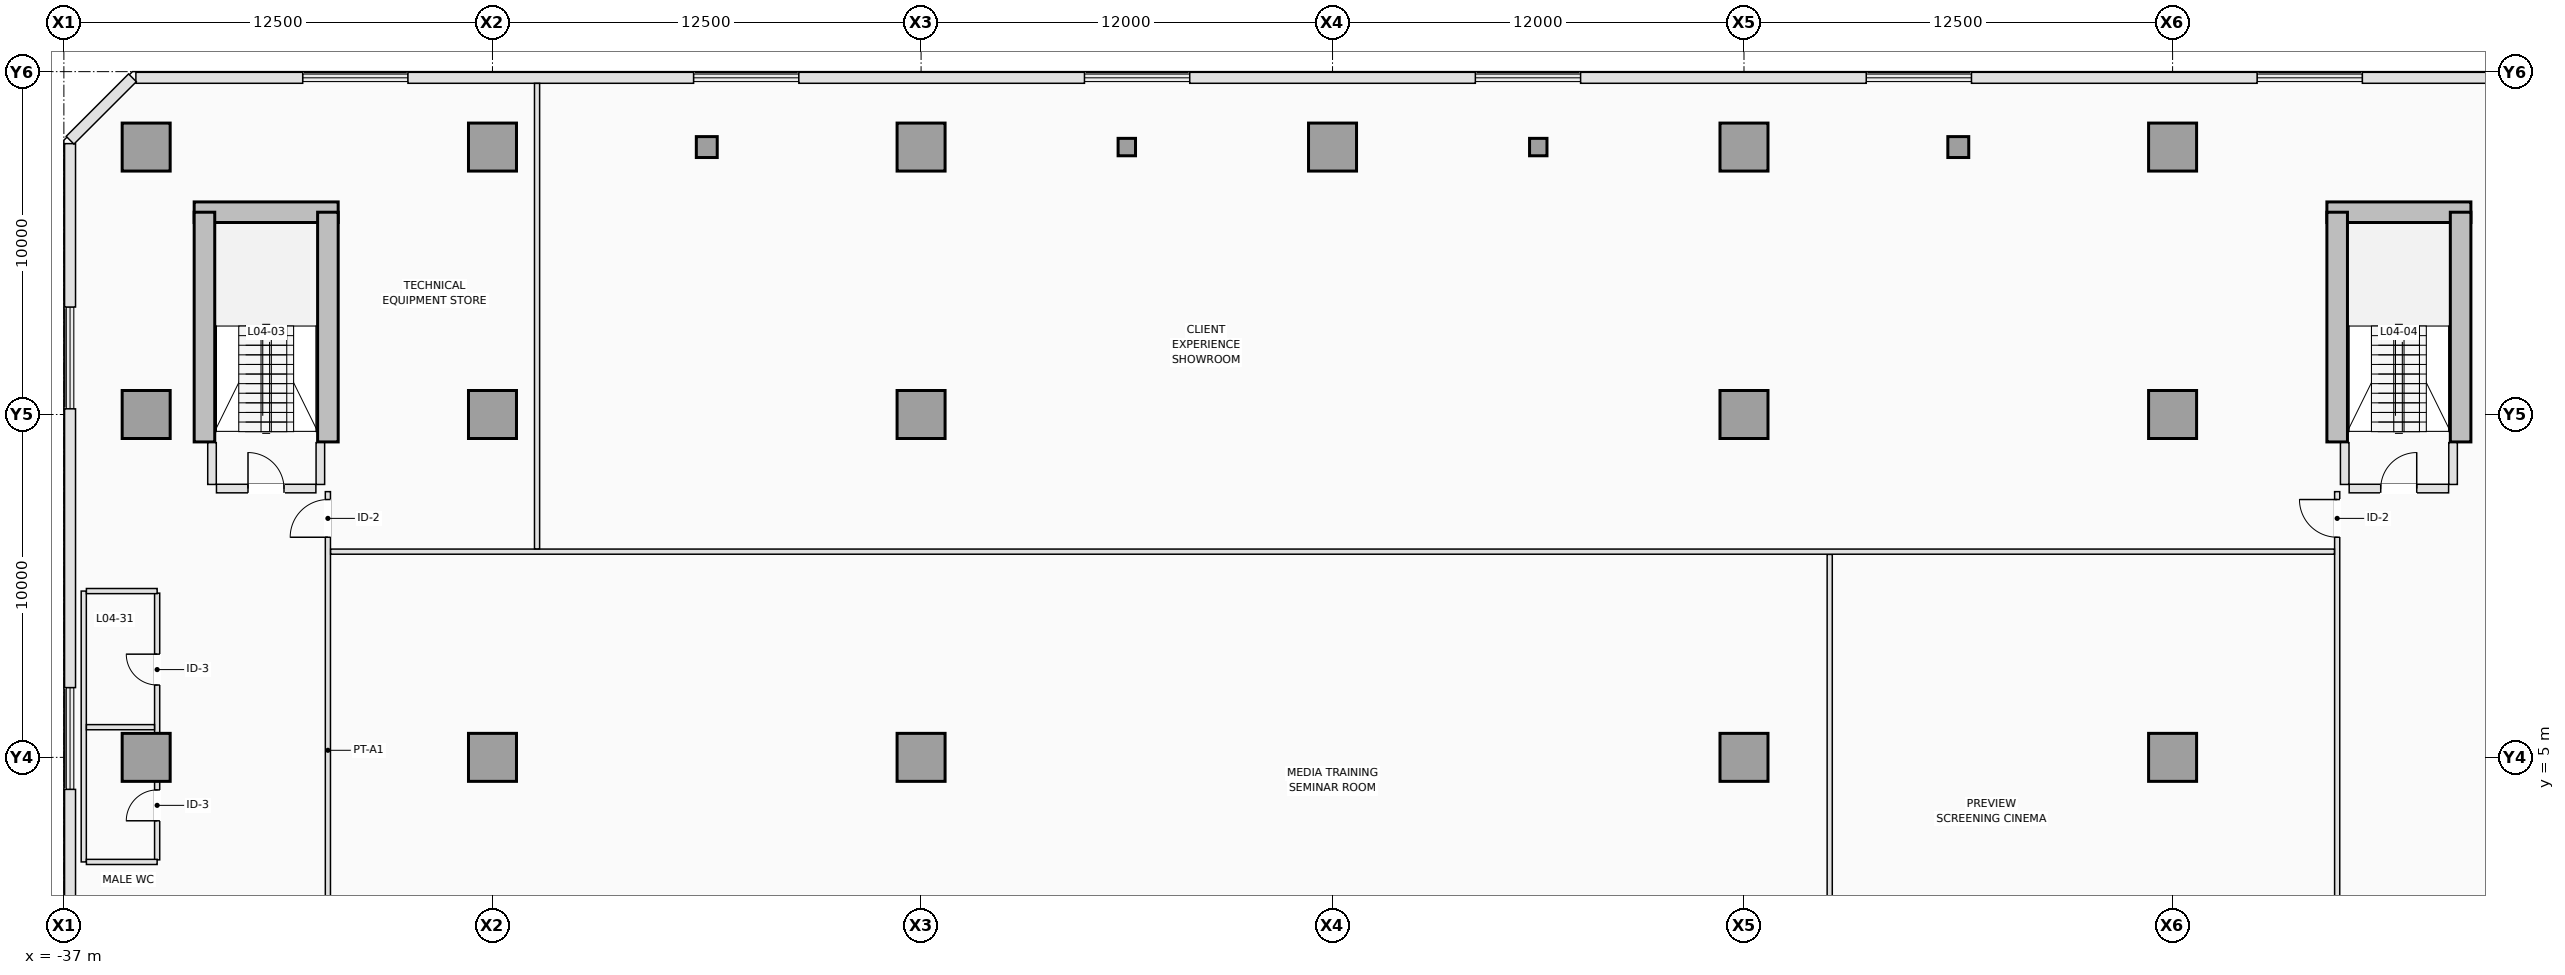
"""IFC4 building model, lengths in metres.
Left out: names, types, materials, properties, quantities, classifications, styles, units other than length and angle.
Written with IfcOpenShell. Run it as: python <this file> out.ifc"""

import sys

from ifc_helpers import new_model, si_unit, direction, frame, frame_2d, origin, origin_2d, place, context, subcontext, project, spatial, rectangle, hollow_circle, extrude, element, fill, save


model = new_model("IFC4")
c1 = context("Model", 3, precision=1e-05, world=origin(), true_north=direction((0.0, 1.0)))
c2 = subcontext(c1, "Body", "Model", "MODEL_VIEW")
j1 = project(units=[si_unit("LENGTHUNIT", "METRE"), si_unit("PLANEANGLEUNIT", "RADIAN")], contexts=[c1])
p1 = place(None, origin())
s1 = spatial("IfcSite", under=j1, at=p1, CompositionType="ELEMENT")
p2 = place(p1, origin())
s2 = spatial("IfcBuilding", under=s1, at=p2, CompositionType="ELEMENT")
p3 = place(p2, frame((0.0, 0.0, 18.5)))
s3 = spatial("IfcBuildingStorey", under=s2, at=p3, CompositionType="ELEMENT", Elevation=18.5)
p4 = place(p3, frame((-33.2, 20.9, 0.0), z_axis=(0.0, 0.0, 1.0), x_axis=(1.0, 0.0, 0.0)))
e1 = element("IfcWall", 1, at=p4, inside=s3, PredefinedType="SHEAR", context=c2, shape_type="SweptSolid", body=[
    extrude(rectangle(XDim=4.2, YDim=0.6, at=frame_2d((2.1, 0.0))), origin(), (0.0, 0.0, 1.0), 4.5),
])
for number, where, z_axis, x_axis in (
    (2, (-32.9, 14.2, 0.0), (0.0, 0.0, 1.0), (0.0, 1.0, 0.0)),
    (3, (-29.3, 14.2, 0.0), (0.0, 0.0, 1.0), (0.0, 1.0, 0.0)),
):
    element("IfcWall", number, at=place(p3, frame(where, z_axis=z_axis, x_axis=x_axis)), inside=s3, PredefinedType="SHEAR", context=c2, shape_type="SweptSolid", body=[
        extrude(rectangle(XDim=6.7, YDim=0.6, at=frame_2d((3.35, 0.0))), origin(), (0.0, 0.0, 1.0), 4.5),
    ])
p5 = place(p3, frame((29.0, 20.9, 0.0), z_axis=(0.0, 0.0, 1.0), x_axis=(1.0, 0.0, 0.0)))
e4 = element("IfcWall", 4, at=p5, inside=s3, PredefinedType="SHEAR", context=c2, shape_type="SweptSolid", body=[
    extrude(rectangle(XDim=4.2, YDim=0.6, at=frame_2d((2.1, 0.0))), origin(), (0.0, 0.0, 1.0), 4.5),
])
for number, where, z_axis, x_axis in (
    (5, (29.3, 14.2, 0.0), (0.0, 0.0, 1.0), (0.0, 1.0, 0.0)),
    (6, (32.9, 14.2, 0.0), (0.0, 0.0, 1.0), (0.0, 1.0, 0.0)),
):
    element("IfcWall", number, at=place(p3, frame(where, z_axis=z_axis, x_axis=x_axis)), inside=s3, PredefinedType="SHEAR", context=c2, shape_type="SweptSolid", body=[
        extrude(rectangle(XDim=6.7, YDim=0.6, at=frame_2d((3.35, 0.0))), origin(), (0.0, 0.0, 1.0), 4.5),
    ])
for number, where, z_axis, x_axis in (
    (7, (-34.6, 5.0, 0.0), (0.0, 0.0, 1.0), (1.0, 0.0, 0.0)),
    (8, (-24.5, 5.0, 0.0), (0.0, 0.0, 1.0), (1.0, 0.0, 0.0)),
    (9, (-12.0, 5.0, 0.0), (0.0, 0.0, 1.0), (1.0, 0.0, 0.0)),
    (10, (12.0, 5.0, 0.0), (0.0, 0.0, 1.0), (1.0, 0.0, 0.0)),
    (11, (24.5, 5.0, 0.0), (0.0, 0.0, 1.0), (1.0, 0.0, 0.0)),
    (12, (-34.6, 15.0, 0.0), (0.0, 0.0, 1.0), (1.0, 0.0, 0.0)),
    (13, (-24.5, 15.0, 0.0), (0.0, 0.0, 1.0), (1.0, 0.0, 0.0)),
    (14, (-12.0, 15.0, 0.0), (0.0, 0.0, 1.0), (1.0, 0.0, 0.0)),
    (15, (12.0, 15.0, 0.0), (0.0, 0.0, 1.0), (1.0, 0.0, 0.0)),
    (16, (24.5, 15.0, 0.0), (0.0, 0.0, 1.0), (1.0, 0.0, 0.0)),
    (17, (-34.6, 22.8, 0.0), (0.0, 0.0, 1.0), (1.0, 0.0, 0.0)),
    (18, (-24.5, 22.8, 0.0), (0.0, 0.0, 1.0), (1.0, 0.0, 0.0)),
    (19, (-12.0, 22.8, 0.0), (0.0, 0.0, 1.0), (1.0, 0.0, 0.0)),
    (20, (0.0, 22.8, 0.0), (0.0, 0.0, 1.0), (1.0, 0.0, 0.0)),
    (21, (12.0, 22.8, 0.0), (0.0, 0.0, 1.0), (1.0, 0.0, 0.0)),
    (22, (24.5, 22.8, 0.0), (0.0, 0.0, 1.0), (1.0, 0.0, 0.0)),
):
    element("IfcColumn", number, at=place(p3, frame(where, z_axis=z_axis, x_axis=x_axis)), inside=s3, PredefinedType="COLUMN", context=c2, shape_type="SweptSolid", body=[
        extrude(rectangle(XDim=1.4, YDim=1.4, at=origin_2d()), origin(), (0.0, 0.0, 1.0), 4.5),
    ])
for number, where, z_axis, x_axis in (
    (23, (-18.25, 22.8, 0.0), (0.0, 0.0, 1.0), (1.0, 0.0, 0.0)),
    (24, (18.25, 22.8, 0.0), (0.0, 0.0, 1.0), (1.0, 0.0, 0.0)),
):
    element("IfcColumn", number, at=place(p3, frame(where, z_axis=z_axis, x_axis=x_axis)), inside=s3, PredefinedType="COLUMN", context=c2, shape_type="SweptSolid", body=[
        extrude(hollow_circle(Radius=0.305, WallThickness=0.025, at=origin_2d()), origin(), (0.0, 0.0, 1.0), 4.5),
    ])
for number, where, z_axis, x_axis in (
    (25, (-6.0, 22.8, 0.0), (0.0, 0.0, 1.0), (1.0, 0.0, 0.0)),
    (26, (6.0, 22.8, 0.0), (0.0, 0.0, 1.0), (1.0, 0.0, 0.0)),
):
    element("IfcColumn", number, at=place(p3, frame(where, z_axis=z_axis, x_axis=x_axis)), inside=s3, PredefinedType="COLUMN", context=c2, shape_type="SweptSolid", body=[
        extrude(hollow_circle(Radius=0.254, WallThickness=0.022, at=origin_2d()), origin(), (0.0, 0.0, 1.0), 4.5),
    ])
p6 = place(p3, frame((-34.9, 24.82, 0.0), z_axis=(0.0, 0.0, 1.0), x_axis=(1.0, 0.0, 0.0)))
e27 = element("IfcWall", 27, at=p6, inside=s3, PredefinedType="STANDARD", context=c2, shape_type="SweptSolid", body=[
    extrude(rectangle(XDim=4.865, YDim=0.32, at=frame_2d((2.433, 0.0))), origin(), (0.0, 0.0, 1.0), 4.08),
])
p7 = place(p3, frame((-26.965, 24.82, 0.0), z_axis=(0.0, 0.0, 1.0), x_axis=(1.0, 0.0, 0.0)))
e28 = element("IfcWall", 28, at=p7, inside=s3, PredefinedType="STANDARD", context=c2, shape_type="SweptSolid", body=[
    extrude(rectangle(XDim=8.33, YDim=0.32, at=frame_2d((4.165, 0.0))), origin(), (0.0, 0.0, 1.0), 4.08),
])
p8 = place(p3, frame((-15.565, 24.82, 0.0), z_axis=(0.0, 0.0, 1.0), x_axis=(1.0, 0.0, 0.0)))
e29 = element("IfcWall", 29, at=p8, inside=s3, PredefinedType="STANDARD", context=c2, shape_type="SweptSolid", body=[
    extrude(rectangle(XDim=8.33, YDim=0.32, at=frame_2d((4.165, 0.0))), origin(), (0.0, 0.0, 1.0), 4.08),
])
p9 = place(p3, frame((-4.165, 24.82, 0.0), z_axis=(0.0, 0.0, 1.0), x_axis=(1.0, 0.0, 0.0)))
e30 = element("IfcWall", 30, at=p9, inside=s3, PredefinedType="STANDARD", context=c2, shape_type="SweptSolid", body=[
    extrude(rectangle(XDim=8.33, YDim=0.32, at=frame_2d((4.165, 0.0))), origin(), (0.0, 0.0, 1.0), 4.08),
])
p10 = place(p3, frame((7.235, 24.82, 0.0), z_axis=(0.0, 0.0, 1.0), x_axis=(1.0, 0.0, 0.0)))
e31 = element("IfcWall", 31, at=p10, inside=s3, PredefinedType="STANDARD", context=c2, shape_type="SweptSolid", body=[
    extrude(rectangle(XDim=8.33, YDim=0.32, at=frame_2d((4.165, 0.0))), origin(), (0.0, 0.0, 1.0), 4.08),
])
p11 = place(p3, frame((18.635, 24.82, 0.0), z_axis=(0.0, 0.0, 1.0), x_axis=(1.0, 0.0, 0.0)))
e32 = element("IfcWall", 32, at=p11, inside=s3, PredefinedType="STANDARD", context=c2, shape_type="SweptSolid", body=[
    extrude(rectangle(XDim=8.33, YDim=0.32, at=frame_2d((4.165, 0.0))), origin(), (0.0, 0.0, 1.0), 4.08),
])
p12 = place(p3, frame((30.035, 24.82, 0.0), z_axis=(0.0, 0.0, 1.0), x_axis=(1.0, 0.0, 0.0)))
e33 = element("IfcWall", 33, at=p12, inside=s3, PredefinedType="STANDARD", context=c2, shape_type="SweptSolid", body=[
    extrude(rectangle(XDim=4.865, YDim=0.32, at=frame_2d((2.433, 0.0))), origin(), (0.0, 0.0, 1.0), 4.08),
])
p13 = place(p3, frame((-36.82, -4.065, 0.0), z_axis=(0.0, 0.0, 1.0), x_axis=(0.0, 1.0, 0.0)))
e34 = element("IfcWall", 34, at=p13, inside=s3, PredefinedType="STANDARD", context=c2, shape_type="SweptSolid", body=[
    extrude(rectangle(XDim=8.131, YDim=0.32, at=frame_2d((4.065, 0.0))), origin(), (0.0, 0.0, 1.0), 4.08),
])
p14 = place(p3, frame((-36.82, 7.035, 0.0), z_axis=(0.0, 0.0, 1.0), x_axis=(0.0, 1.0, 0.0)))
e35 = element("IfcWall", 35, at=p14, inside=s3, PredefinedType="STANDARD", context=c2, shape_type="SweptSolid", body=[
    extrude(rectangle(XDim=8.131, YDim=0.32, at=frame_2d((4.065, 0.0))), origin(), (0.0, 0.0, 1.0), 4.08),
])
p15 = place(p3, frame((-36.82, 18.135, 0.0), z_axis=(0.0, 0.0, 1.0), x_axis=(0.0, 1.0, 0.0)))
e36 = element("IfcWall", 36, at=p15, inside=s3, PredefinedType="STANDARD", context=c2, shape_type="SweptSolid", body=[
    extrude(rectangle(XDim=4.765, YDim=0.32, at=frame_2d((2.383, 0.0))), origin(), (0.0, 0.0, 1.0), 4.08),
])
p16 = place(p3, frame((-36.82, 23.0, 0.0), z_axis=(0.0, 0.0, 1.0), x_axis=(0.707106781187, 0.707106781187, 0.0)))
e37 = element("IfcWall", 37, at=p16, inside=s3, PredefinedType="STANDARD", context=c2, shape_type="SweptSolid", body=[
    extrude(rectangle(XDim=2.574, YDim=0.32, at=frame_2d((1.287, 0.0))), origin(), (0.0, 0.0, 1.0), 4.08),
])
p17 = place(p3, frame((-32.55, 12.84, 0.0), z_axis=(0.0, 0.0, 1.0), x_axis=(1.0, 0.0, 0.0)))
e38 = element("IfcWall", 38, at=p17, inside=s3, PredefinedType="PARTITIONING", context=c2, shape_type="SweptSolid", body=[
    extrude(rectangle(XDim=2.9, YDim=0.25, at=frame_2d((1.45, 0.0))), origin(), (0.0, 0.0, 1.0), 4.08),
])
p18 = place(p17, frame((0.92, 0.0, 0.0)))
e39 = element("IfcOpeningElement", 39, at=p18, cuts=e38, PredefinedType="OPENING", context=c2, shape_type="SweptSolid", body=[
    extrude(rectangle(XDim=1.05, YDim=2.15, at=frame_2d((0.525, 1.075))), frame((0.0, 0.135, 0.0), z_axis=(0.0, -1.0, 0.0), x_axis=(1.0, 0.0, 0.0)), (0.0, 0.0, 1.0), 0.27),
])
p19 = place(p3, frame((29.65, 12.84, 0.0), z_axis=(0.0, 0.0, 1.0), x_axis=(1.0, 0.0, 0.0)))
e40 = element("IfcWall", 40, at=p19, inside=s3, PredefinedType="PARTITIONING", context=c2, shape_type="SweptSolid", body=[
    extrude(rectangle(XDim=2.9, YDim=0.25, at=frame_2d((1.45, 0.0))), origin(), (0.0, 0.0, 1.0), 4.08),
])
p20 = place(p19, frame((0.92, 0.0, 0.0)))
e41 = element("IfcOpeningElement", 41, at=p20, cuts=e40, PredefinedType="OPENING", context=c2, shape_type="SweptSolid", body=[
    extrude(rectangle(XDim=1.05, YDim=2.15, at=frame_2d((0.525, 1.075))), frame((0.0, 0.135, 0.0), z_axis=(0.0, -1.0, 0.0), x_axis=(1.0, 0.0, 0.0)), (0.0, 0.0, 1.0), 0.27),
])
for number, where, z_axis, x_axis in (
    (42, (-32.68, 12.96, 0.0), (0.0, 0.0, 1.0), (0.0, 1.0, 0.0)),
    (43, (-29.52, 12.96, 0.0), (0.0, 0.0, 1.0), (0.0, 1.0, 0.0)),
    (44, (29.52, 12.96, 0.0), (0.0, 0.0, 1.0), (0.0, 1.0, 0.0)),
    (45, (32.68, 12.96, 0.0), (0.0, 0.0, 1.0), (0.0, 1.0, 0.0)),
):
    element("IfcWall", number, at=place(p3, frame(where, z_axis=z_axis, x_axis=x_axis)), inside=s3, PredefinedType="PARTITIONING", context=c2, shape_type="SweptSolid", body=[
        extrude(rectangle(XDim=1.22, YDim=0.25, at=frame_2d((0.61, 0.0))), origin(), (0.0, 0.0, 1.0), 4.08),
    ])
p21 = place(p3, frame((-29.3, -2.338, 0.0), z_axis=(0.0, 0.0, 1.0), x_axis=(0.0, 1.0, 0.0)))
e46 = element("IfcWall", 46, at=p21, inside=s3, PredefinedType="PARTITIONING", context=c2, shape_type="SweptSolid", body=[
    extrude(rectangle(XDim=15.088, YDim=0.15, at=frame_2d((7.544, 0.0))), origin(), (0.0, 0.0, 1.0), 4.08),
])
p22 = place(p21, frame((13.758, 0.0, 0.0)))
e47 = element("IfcOpeningElement", 47, at=p22, cuts=e46, PredefinedType="OPENING", context=c2, shape_type="SweptSolid", body=[
    extrude(rectangle(XDim=1.1, YDim=2.15, at=frame_2d((0.55, 1.075))), frame((0.0, 0.085, 0.0), z_axis=(0.0, -1.0, 0.0), x_axis=(1.0, 0.0, 0.0)), (0.0, 0.0, 1.0), 0.17),
])
p23 = place(p3, frame((29.3, -2.338, 0.0), z_axis=(0.0, 0.0, 1.0), x_axis=(0.0, 1.0, 0.0)))
e48 = element("IfcWall", 48, at=p23, inside=s3, PredefinedType="PARTITIONING", context=c2, shape_type="SweptSolid", body=[
    extrude(rectangle(XDim=15.088, YDim=0.15, at=frame_2d((7.544, 0.0))), origin(), (0.0, 0.0, 1.0), 4.08),
])
p24 = place(p23, frame((13.758, 0.0, 0.0)))
e49 = element("IfcOpeningElement", 49, at=p24, cuts=e48, PredefinedType="OPENING", context=c2, shape_type="SweptSolid", body=[
    extrude(rectangle(XDim=1.1, YDim=2.15, at=frame_2d((0.55, 1.075))), frame((0.0, 0.085, 0.0), z_axis=(0.0, -1.0, 0.0), x_axis=(1.0, 0.0, 0.0)), (0.0, 0.0, 1.0), 0.17),
])
p25 = place(p3, frame((14.5, -2.338, 0.0), z_axis=(0.0, 0.0, 1.0), x_axis=(0.0, 1.0, 0.0)))
e50 = element("IfcWall", 50, at=p25, inside=s3, PredefinedType="PARTITIONING", context=c2, shape_type="SweptSolid", body=[
    extrude(rectangle(XDim=13.258, YDim=0.15, at=frame_2d((6.629, 0.0))), origin(), (0.0, 0.0, 1.0), 4.08),
])
p26 = place(p3, frame((-29.22, 11.0, 0.0), z_axis=(0.0, 0.0, 1.0), x_axis=(1.0, 0.0, 0.0)))
e51 = element("IfcWall", 51, at=p26, inside=s3, PredefinedType="PARTITIONING", context=c2, shape_type="SweptSolid", body=[
    extrude(rectangle(XDim=58.44, YDim=0.15, at=frame_2d((29.22, 0.0))), origin(), (0.0, 0.0, 1.0), 4.08),
])
p27 = place(p3, frame((-36.42, 1.95, 0.0), z_axis=(0.0, 0.0, 1.0), x_axis=(0.0, 1.0, 0.0)))
e52 = element("IfcWall", 52, at=p27, inside=s3, PredefinedType="PARTITIONING", context=c2, shape_type="SweptSolid", body=[
    extrude(rectangle(XDim=7.9, YDim=0.15, at=frame_2d((3.95, 0.0))), origin(), (0.0, 0.0, 1.0), 4.08),
])
p28 = place(p3, frame((-34.28, 2.01, 0.0), z_axis=(0.0, 0.0, 1.0), x_axis=(0.0, 1.0, 0.0)))
e53 = element("IfcWall", 53, at=p28, inside=s3, PredefinedType="PARTITIONING", context=c2, shape_type="SweptSolid", body=[
    extrude(rectangle(XDim=2.288, YDim=0.15, at=frame_2d((1.144, 0.0))), origin(), (0.0, 0.0, 1.0), 4.08),
])
p29 = place(p28, frame((1.14, 0.0, 0.0)))
e54 = element("IfcOpeningElement", 54, at=p29, cuts=e53, PredefinedType="OPENING", context=c2, shape_type="SweptSolid", body=[
    extrude(rectangle(XDim=0.9, YDim=2.12, at=frame_2d((0.45, 1.06))), frame((0.0, 0.085, 0.0), z_axis=(0.0, -1.0, 0.0), x_axis=(1.0, 0.0, 0.0)), (0.0, 0.0, 1.0), 0.17),
])
p30 = place(p3, frame((-34.28, 5.702, 0.0), z_axis=(0.0, 0.0, 1.0), x_axis=(0.0, 1.0, 0.0)))
e55 = element("IfcWall", 55, at=p30, inside=s3, PredefinedType="PARTITIONING", context=c2, shape_type="SweptSolid", body=[
    extrude(rectangle(XDim=4.088, YDim=0.15, at=frame_2d((2.044, 0.0))), origin(), (0.0, 0.0, 1.0), 4.08),
])
p31 = place(p30, frame((1.408, 0.0, 0.0)))
e56 = element("IfcOpeningElement", 56, at=p31, cuts=e55, PredefinedType="OPENING", context=c2, shape_type="SweptSolid", body=[
    extrude(rectangle(XDim=0.9, YDim=2.12, at=frame_2d((0.45, 1.06))), frame((0.0, 0.085, 0.0), z_axis=(0.0, -1.0, 0.0), x_axis=(1.0, 0.0, 0.0)), (0.0, 0.0, 1.0), 0.17),
])
p32 = place(p3, frame((-36.343, 5.88, 0.0), z_axis=(0.0, 0.0, 1.0), x_axis=(1.0, 0.0, 0.0)))
e57 = element("IfcWall", 57, at=p32, inside=s3, PredefinedType="PARTITIONING", context=c2, shape_type="SweptSolid", body=[
    extrude(rectangle(XDim=1.986, YDim=0.15, at=frame_2d((0.993, 0.0))), origin(), (0.0, 0.0, 1.0), 4.08),
])
for number, where, z_axis, x_axis in (
    (58, (-36.343, 1.95, 0.0), (0.0, 0.0, 1.0), (1.0, 0.0, 0.0)),
    (59, (-36.343, 9.85, 0.0), (0.0, 0.0, 1.0), (1.0, 0.0, 0.0)),
):
    element("IfcWall", number, at=place(p3, frame(where, z_axis=z_axis, x_axis=x_axis)), inside=s3, PredefinedType="PARTITIONING", context=c2, shape_type="SweptSolid", body=[
        extrude(rectangle(XDim=2.063, YDim=0.15, at=frame_2d((1.031, 0.0))), origin(), (0.0, 0.0, 1.0), 4.08),
    ])
p33 = place(p3, frame((-23.2, 11.08, 0.0), z_axis=(0.0, 0.0, 1.0), x_axis=(0.0, 1.0, 0.0)))
e60 = element("IfcWall", 60, at=p33, inside=s3, PredefinedType="PARTITIONING", context=c2, shape_type="SweptSolid", body=[
    extrude(rectangle(XDim=13.578, YDim=0.15, at=frame_2d((6.789, 0.0))), origin(), (0.0, 0.0, 1.0), 4.08),
])
p34 = place(p18, origin())
e61 = element("IfcDoor", 61, at=p34, inside=s3, OperationType="SINGLE_SWING_LEFT", PredefinedType="DOOR", context=c2, shape_type="SweptSolid", body=[
    extrude(rectangle(XDim=1.05, YDim=2.15, at=frame_2d((0.525, 1.075))), frame((0.0, 0.025, 0.0), z_axis=(0.0, -1.0, 0.0), x_axis=(1.0, 0.0, 0.0)), (0.0, 0.0, 1.0), 0.05),
])
fill(e39, e61)
p35 = place(p20, origin())
e62 = element("IfcDoor", 62, at=p35, inside=s3, OperationType="SINGLE_SWING_RIGHT", PredefinedType="DOOR", context=c2, shape_type="SweptSolid", body=[
    extrude(rectangle(XDim=1.05, YDim=2.15, at=frame_2d((0.525, 1.075))), frame((0.0, 0.025, 0.0), z_axis=(0.0, -1.0, 0.0), x_axis=(1.0, 0.0, 0.0)), (0.0, 0.0, 1.0), 0.05),
])
fill(e41, e62)
p36 = place(p22, origin())
e63 = element("IfcDoor", 63, at=p36, inside=s3, OperationType="SINGLE_SWING_LEFT", PredefinedType="DOOR", context=c2, shape_type="SweptSolid", body=[
    extrude(rectangle(XDim=1.1, YDim=2.15, at=frame_2d((0.55, 1.075))), frame((0.0, 0.025, 0.0), z_axis=(0.0, -1.0, 0.0), x_axis=(1.0, 0.0, 0.0)), (0.0, 0.0, 1.0), 0.05),
])
fill(e47, e63)
p37 = place(p29, origin())
e64 = element("IfcDoor", 64, at=p37, inside=s3, OperationType="SINGLE_SWING_LEFT", PredefinedType="DOOR", context=c2, shape_type="SweptSolid", body=[
    extrude(rectangle(XDim=0.9, YDim=2.12, at=frame_2d((0.45, 1.06))), frame((0.0, 0.025, 0.0), z_axis=(0.0, -1.0, 0.0), x_axis=(1.0, 0.0, 0.0)), (0.0, 0.0, 1.0), 0.05),
])
fill(e54, e64)
p38 = place(p31, origin())
e65 = element("IfcDoor", 65, at=p38, inside=s3, OperationType="SINGLE_SWING_RIGHT", PredefinedType="DOOR", context=c2, shape_type="SweptSolid", body=[
    extrude(rectangle(XDim=0.9, YDim=2.12, at=frame_2d((0.45, 1.06))), frame((0.0, 0.025, 0.0), z_axis=(0.0, -1.0, 0.0), x_axis=(1.0, 0.0, 0.0)), (0.0, 0.0, 1.0), 0.05),
])
fill(e56, e65)
p39 = place(p24, origin())
e66 = element("IfcDoor", 66, at=p39, inside=s3, OperationType="SINGLE_SWING_RIGHT", PredefinedType="DOOR", context=c2, shape_type="SweptSolid", body=[
    extrude(rectangle(XDim=1.1, YDim=2.15, at=frame_2d((0.55, 1.075))), frame((0.0, 0.025, 0.0), z_axis=(0.0, -1.0, 0.0), x_axis=(1.0, 0.0, 0.0)), (0.0, 0.0, 1.0), 0.05),
])
fill(e49, e66)
save(model, sys.argv[1])
